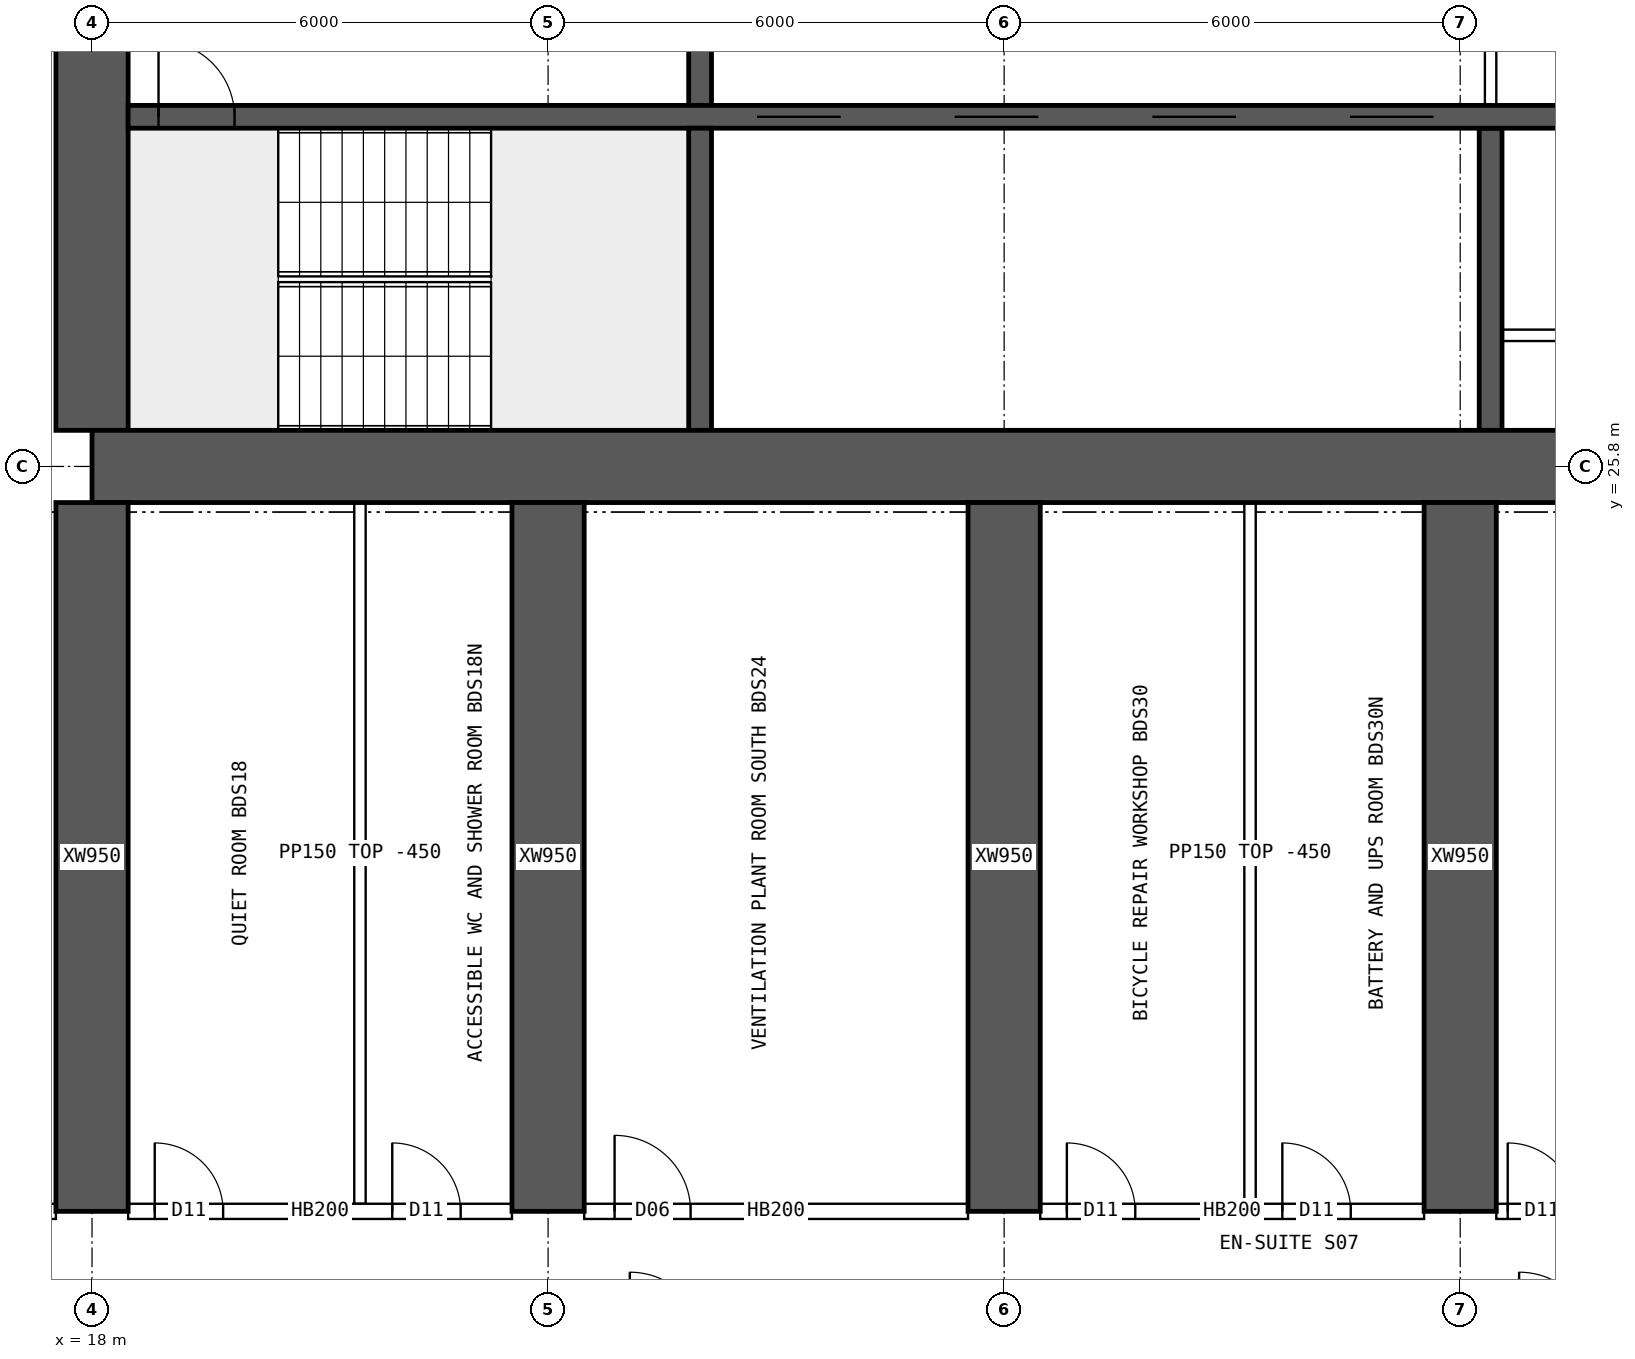
"""IFC4 building model, lengths in metres.
Left out: names, types, materials, properties, quantities, classifications, styles, units other than length and angle.
Written with IfcOpenShell. Run it as: python <this file> out.ifc"""

import sys

from ifc_helpers import new_model, si_unit, direction, frame, frame_2d, origin, place, context, subcontext, project, spatial, rectangle, extrude, element, fill, save


model = new_model("IFC4")
c1 = context("Model", 3, precision=1e-05, world=origin(), true_north=direction((0.0, 1.0)))
c2 = subcontext(c1, "Body", "Model", "MODEL_VIEW")
j1 = project(units=[si_unit("LENGTHUNIT", "METRE"), si_unit("PLANEANGLEUNIT", "RADIAN")], contexts=[c1])
p1 = place(None, origin())
s1 = spatial("IfcSite", under=j1, at=p1, CompositionType="ELEMENT")
p2 = place(p1, origin())
s2 = spatial("IfcBuilding", under=s1, at=p2, CompositionType="ELEMENT")
p3 = place(p2, frame((0.0, 0.0, 95.65)))
s3 = spatial("IfcBuildingStorey", under=s2, at=p3, CompositionType="ELEMENT", Elevation=95.65)
p4 = place(p3, frame((18.0, 25.8, 0.0), z_axis=(0.0, 0.0, 1.0), x_axis=(1.0, 0.0, 0.0)))
e1 = element("IfcWall", 1, at=p4, inside=s3, PredefinedType="SHEAR", context=c2, shape_type="SweptSolid", body=[
    extrude(rectangle(XDim=48.0, YDim=0.95, at=frame_2d((24.0, 0.0))), origin(), (0.0, 0.0, 1.0), 3.75),
])
p5 = place(p3, frame((18.0, 26.275, 0.0), z_axis=(0.0, 0.0, 1.0), x_axis=(0.0, 1.0, 0.0)))
e2 = element("IfcWall", 2, at=p5, inside=s3, PredefinedType="SHEAR", context=c2, shape_type="SweptSolid", body=[
    extrude(rectangle(XDim=11.45, YDim=0.95, at=frame_2d((5.725, 0.0))), origin(), (0.0, 0.0, 1.0), 3.75),
])
p6 = place(p5, frame((5.025, 0.0, 0.0)))
e3 = element("IfcOpeningElement", 3, at=p6, cuts=e2, PredefinedType="OPENING", context=c2, shape_type="SweptSolid", body=[
    extrude(rectangle(XDim=1.2, YDim=2.1, at=frame_2d((0.6, 1.05))), frame((0.0, 0.485, 0.0), z_axis=(0.0, -1.0, 0.0), x_axis=(1.0, 0.0, 0.0)), (0.0, 0.0, 1.0), 0.97),
])
p7 = place(p3, frame((18.475, 30.4, 0.0), z_axis=(0.0, 0.0, 1.0), x_axis=(1.0, 0.0, 0.0)))
e4 = element("IfcWall", 4, at=p7, inside=s3, PredefinedType="SHEAR", context=c2, shape_type="SweptSolid", body=[
    extrude(rectangle(XDim=47.05, YDim=0.3, at=frame_2d((23.525, 0.0))), origin(), (0.0, 0.0, 1.0), 3.75),
])
p8 = place(p7, frame((0.4, 0.0, 0.0)))
e5 = element("IfcOpeningElement", 5, at=p8, cuts=e4, PredefinedType="OPENING", context=c2, shape_type="SweptSolid", body=[
    extrude(rectangle(XDim=1.0, YDim=2.1, at=frame_2d((0.5, 1.05))), frame((0.0, 0.16, 0.0), z_axis=(0.0, -1.0, 0.0), x_axis=(1.0, 0.0, 0.0)), (0.0, 0.0, 1.0), 0.32),
])
p9 = place(p7, frame((45.65, 0.0, 0.0)))
e6 = element("IfcOpeningElement", 6, at=p9, cuts=e4, PredefinedType="OPENING", context=c2, shape_type="SweptSolid", body=[
    extrude(rectangle(XDim=1.0, YDim=2.1, at=frame_2d((0.5, 1.05))), frame((0.0, 0.16, 0.0), z_axis=(0.0, -1.0, 0.0), x_axis=(1.0, 0.0, 0.0)), (0.0, 0.0, 1.0), 0.32),
])
p10 = place(p7, frame((8.275, 0.0, 0.0)))
e7 = element("IfcOpeningElement", 7, at=p10, cuts=e4, PredefinedType="OPENING", context=c2, shape_type="SweptSolid", body=[
    extrude(rectangle(XDim=1.1, YDim=2.1, at=frame_2d((0.55, 1.05))), frame((0.0, 0.16, 0.0), z_axis=(0.0, -1.0, 0.0), x_axis=(1.0, 0.0, 0.0)), (0.0, 0.0, 1.0), 0.32),
])
p11 = place(p7, frame((10.875, 0.0, 0.0)))
e8 = element("IfcOpeningElement", 8, at=p11, cuts=e4, PredefinedType="OPENING", context=c2, shape_type="SweptSolid", body=[
    extrude(rectangle(XDim=1.1, YDim=2.1, at=frame_2d((0.55, 1.05))), frame((0.0, 0.16, 0.0), z_axis=(0.0, -1.0, 0.0), x_axis=(1.0, 0.0, 0.0)), (0.0, 0.0, 1.0), 0.32),
])
p12 = place(p7, frame((13.475, 0.0, 0.0)))
e9 = element("IfcOpeningElement", 9, at=p12, cuts=e4, PredefinedType="OPENING", context=c2, shape_type="SweptSolid", body=[
    extrude(rectangle(XDim=1.1, YDim=2.1, at=frame_2d((0.55, 1.05))), frame((0.0, 0.16, 0.0), z_axis=(0.0, -1.0, 0.0), x_axis=(1.0, 0.0, 0.0)), (0.0, 0.0, 1.0), 0.32),
])
p13 = place(p7, frame((16.075, 0.0, 0.0)))
e10 = element("IfcOpeningElement", 10, at=p13, cuts=e4, PredefinedType="OPENING", context=c2, shape_type="SweptSolid", body=[
    extrude(rectangle(XDim=1.1, YDim=2.1, at=frame_2d((0.55, 1.05))), frame((0.0, 0.16, 0.0), z_axis=(0.0, -1.0, 0.0), x_axis=(1.0, 0.0, 0.0)), (0.0, 0.0, 1.0), 0.32),
])
p14 = place(p7, frame((18.85, 0.0, 0.0)))
e11 = element("IfcOpeningElement", 11, at=p14, cuts=e4, PredefinedType="OPENING", context=c2, shape_type="SweptSolid", body=[
    extrude(rectangle(XDim=0.9, YDim=2.1, at=frame_2d((0.45, 1.05))), frame((0.0, 0.16, 0.0), z_axis=(0.0, -1.0, 0.0), x_axis=(1.0, 0.0, 0.0)), (0.0, 0.0, 1.0), 0.32),
])
p15 = place(p7, frame((30.142, 0.0, 0.0)))
e12 = element("IfcOpeningElement", 12, at=p15, cuts=e4, PredefinedType="OPENING", context=c2, shape_type="SweptSolid", body=[
    extrude(rectangle(XDim=1.1, YDim=2.1, at=frame_2d((0.55, 1.05))), frame((0.0, 0.16, 0.0), z_axis=(0.0, -1.0, 0.0), x_axis=(1.0, 0.0, 0.0)), (0.0, 0.0, 1.0), 0.32),
])
p16 = place(p7, frame((33.675, 0.0, 0.0)))
e13 = element("IfcOpeningElement", 13, at=p16, cuts=e4, PredefinedType="OPENING", context=c2, shape_type="SweptSolid", body=[
    extrude(rectangle(XDim=1.1, YDim=2.1, at=frame_2d((0.55, 1.05))), frame((0.0, 0.16, 0.0), z_axis=(0.0, -1.0, 0.0), x_axis=(1.0, 0.0, 0.0)), (0.0, 0.0, 1.0), 0.32),
])
p17 = place(p7, frame((37.208, 0.0, 0.0)))
e14 = element("IfcOpeningElement", 14, at=p17, cuts=e4, PredefinedType="OPENING", context=c2, shape_type="SweptSolid", body=[
    extrude(rectangle(XDim=1.1, YDim=2.1, at=frame_2d((0.55, 1.05))), frame((0.0, 0.16, 0.0), z_axis=(0.0, -1.0, 0.0), x_axis=(1.0, 0.0, 0.0)), (0.0, 0.0, 1.0), 0.32),
])
p18 = place(p3, frame((26.0, 26.275, 0.0), z_axis=(0.0, 0.0, 1.0), x_axis=(0.0, 1.0, 0.0)))
e15 = element("IfcWall", 15, at=p18, inside=s3, PredefinedType="SHEAR", context=c2, shape_type="SweptSolid", body=[
    extrude(rectangle(XDim=3.975, YDim=0.3, at=frame_2d((1.988, 0.0))), origin(), (0.0, 0.0, 1.0), 3.75),
])
p19 = place(p3, frame((26.0, 30.55, 0.0), z_axis=(0.0, 0.0, 1.0), x_axis=(0.0, 1.0, 0.0)))
e16 = element("IfcWall", 16, at=p19, inside=s3, PredefinedType="SHEAR", context=c2, shape_type="SweptSolid", body=[
    extrude(rectangle(XDim=3.9, YDim=0.3, at=frame_2d((1.95, 0.0))), origin(), (0.0, 0.0, 1.0), 3.75),
])
p20 = place(p19, frame((1.4, 0.0, 0.0)))
e17 = element("IfcOpeningElement", 17, at=p20, cuts=e16, PredefinedType="OPENING", context=c2, shape_type="SweptSolid", body=[
    extrude(rectangle(XDim=1.2, YDim=2.1, at=frame_2d((0.6, 1.05))), frame((0.0, 0.16, 0.0), z_axis=(0.0, -1.0, 0.0), x_axis=(1.0, 0.0, 0.0)), (0.0, 0.0, 1.0), 0.32),
])
p21 = place(p3, frame((36.4, 26.275, 0.0), z_axis=(0.0, 0.0, 1.0), x_axis=(0.0, 1.0, 0.0)))
e18 = element("IfcWall", 18, at=p21, inside=s3, PredefinedType="SHEAR", context=c2, shape_type="SweptSolid", body=[
    extrude(rectangle(XDim=3.975, YDim=0.3, at=frame_2d((1.988, 0.0))), origin(), (0.0, 0.0, 1.0), 3.75),
])
for number, where, z_axis, x_axis in (
    (19, (18.0, 16.0, 0.0), (0.0, 0.0, 1.0), (0.0, 1.0, 0.0)),
    (20, (24.0, 16.0, 0.0), (0.0, 0.0, 1.0), (0.0, 1.0, 0.0)),
    (21, (30.0, 16.0, 0.0), (0.0, 0.0, 1.0), (0.0, 1.0, 0.0)),
    (22, (36.0, 16.0, 0.0), (0.0, 0.0, 1.0), (0.0, 1.0, 0.0)),
):
    element("IfcWall", number, at=place(p3, frame(where, z_axis=z_axis, x_axis=x_axis)), inside=s3, PredefinedType="SHEAR", context=c2, shape_type="SweptSolid", body=[
        extrude(rectangle(XDim=9.325, YDim=0.95, at=frame_2d((4.663, 0.0))), origin(), (0.0, 0.0, 1.0), 3.75),
    ])
p22 = place(p3, frame((36.4, 30.55, 0.0), z_axis=(0.0, 0.0, 1.0), x_axis=(0.0, 1.0, 0.0)))
e23 = element("IfcWall", 23, at=p22, inside=s3, PredefinedType="SOLIDWALL", context=c2, shape_type="SweptSolid", body=[
    extrude(rectangle(XDim=3.9, YDim=0.15, at=frame_2d((1.95, 0.0))), origin(), (0.0, 0.0, 1.0), 3.3),
])
p23 = place(p22, frame((1.15, 0.0, 0.0)))
e24 = element("IfcOpeningElement", 24, at=p23, cuts=e23, PredefinedType="OPENING", context=c2, shape_type="SweptSolid", body=[
    extrude(rectangle(XDim=1.6, YDim=2.1, at=frame_2d((0.8, 1.05))), frame((0.0, 0.085, 0.0), z_axis=(0.0, -1.0, 0.0), x_axis=(1.0, 0.0, 0.0)), (0.0, 0.0, 1.0), 0.17),
])
p24 = place(p3, frame((36.55, 27.525, 0.0), z_axis=(0.0, 0.0, 1.0), x_axis=(1.0, 0.0, 0.0)))
e25 = element("IfcWall", 25, at=p24, inside=s3, PredefinedType="SOLIDWALL", context=c2, shape_type="SweptSolid", body=[
    extrude(rectangle(XDim=2.5, YDim=0.15, at=frame_2d((1.25, 0.0))), origin(), (0.0, 0.0, 1.0), 3.3),
])
p25 = place(p24, frame((0.8, 0.0, 0.0)))
e26 = element("IfcOpeningElement", 26, at=p25, cuts=e25, PredefinedType="OPENING", context=c2, shape_type="SweptSolid", body=[
    extrude(rectangle(XDim=0.9, YDim=2.1, at=frame_2d((0.45, 1.05))), frame((0.0, 0.085, 0.0), z_axis=(0.0, -1.0, 0.0), x_axis=(1.0, 0.0, 0.0)), (0.0, 0.0, 1.0), 0.17),
])
p26 = place(p3, frame((12.475, 16.0, 0.0), z_axis=(0.0, 0.0, 1.0), x_axis=(1.0, 0.0, 0.0)))
e27 = element("IfcWall", 27, at=p26, inside=s3, PredefinedType="SOLIDWALL", context=c2, shape_type="SweptSolid", body=[
    extrude(rectangle(XDim=5.05, YDim=0.2, at=frame_2d((2.525, 0.0))), origin(), (0.0, 0.0, 1.0), 3.3),
])
p27 = place(p26, frame((3.325, 0.0, 0.0)))
e28 = element("IfcOpeningElement", 28, at=p27, cuts=e27, PredefinedType="OPENING", context=c2, shape_type="SweptSolid", body=[
    extrude(rectangle(XDim=1.6, YDim=2.1, at=frame_2d((0.8, 1.05))), frame((0.0, 0.11, 0.0), z_axis=(0.0, -1.0, 0.0), x_axis=(1.0, 0.0, 0.0)), (0.0, 0.0, 1.0), 0.22),
])
p28 = place(p3, frame((18.475, 16.0, 0.0), z_axis=(0.0, 0.0, 1.0), x_axis=(1.0, 0.0, 0.0)))
e29 = element("IfcWall", 29, at=p28, inside=s3, PredefinedType="SOLIDWALL", context=c2, shape_type="SweptSolid", body=[
    extrude(rectangle(XDim=5.05, YDim=0.2, at=frame_2d((2.525, 0.0))), origin(), (0.0, 0.0, 1.0), 3.3),
])
p29 = place(p28, frame((0.35, 0.0, 0.0)))
e30 = element("IfcOpeningElement", 30, at=p29, cuts=e29, PredefinedType="OPENING", context=c2, shape_type="SweptSolid", body=[
    extrude(rectangle(XDim=0.9, YDim=2.1, at=frame_2d((0.45, 1.05))), frame((0.0, 0.11, 0.0), z_axis=(0.0, -1.0, 0.0), x_axis=(1.0, 0.0, 0.0)), (0.0, 0.0, 1.0), 0.22),
])
p30 = place(p28, frame((3.475, 0.0, 0.0)))
e31 = element("IfcOpeningElement", 31, at=p30, cuts=e29, PredefinedType="OPENING", context=c2, shape_type="SweptSolid", body=[
    extrude(rectangle(XDim=0.9, YDim=2.1, at=frame_2d((0.45, 1.05))), frame((0.0, 0.11, 0.0), z_axis=(0.0, -1.0, 0.0), x_axis=(1.0, 0.0, 0.0)), (0.0, 0.0, 1.0), 0.22),
])
p31 = place(p3, frame((24.475, 16.0, 0.0), z_axis=(0.0, 0.0, 1.0), x_axis=(1.0, 0.0, 0.0)))
e32 = element("IfcWall", 32, at=p31, inside=s3, PredefinedType="SOLIDWALL", context=c2, shape_type="SweptSolid", body=[
    extrude(rectangle(XDim=5.05, YDim=0.2, at=frame_2d((2.525, 0.0))), origin(), (0.0, 0.0, 1.0), 3.3),
])
p32 = place(p31, frame((0.4, 0.0, 0.0)))
e33 = element("IfcOpeningElement", 33, at=p32, cuts=e32, PredefinedType="OPENING", context=c2, shape_type="SweptSolid", body=[
    extrude(rectangle(XDim=1.0, YDim=2.1, at=frame_2d((0.5, 1.05))), frame((0.0, 0.11, 0.0), z_axis=(0.0, -1.0, 0.0), x_axis=(1.0, 0.0, 0.0)), (0.0, 0.0, 1.0), 0.22),
])
p33 = place(p3, frame((30.475, 16.0, 0.0), z_axis=(0.0, 0.0, 1.0), x_axis=(1.0, 0.0, 0.0)))
e34 = element("IfcWall", 34, at=p33, inside=s3, PredefinedType="SOLIDWALL", context=c2, shape_type="SweptSolid", body=[
    extrude(rectangle(XDim=5.05, YDim=0.2, at=frame_2d((2.525, 0.0))), origin(), (0.0, 0.0, 1.0), 3.3),
])
p34 = place(p33, frame((0.35, 0.0, 0.0)))
e35 = element("IfcOpeningElement", 35, at=p34, cuts=e34, PredefinedType="OPENING", context=c2, shape_type="SweptSolid", body=[
    extrude(rectangle(XDim=0.9, YDim=2.1, at=frame_2d((0.45, 1.05))), frame((0.0, 0.11, 0.0), z_axis=(0.0, -1.0, 0.0), x_axis=(1.0, 0.0, 0.0)), (0.0, 0.0, 1.0), 0.22),
])
p35 = place(p33, frame((3.185, 0.0, 0.0)))
e36 = element("IfcOpeningElement", 36, at=p35, cuts=e34, PredefinedType="OPENING", context=c2, shape_type="SweptSolid", body=[
    extrude(rectangle(XDim=0.9, YDim=2.1, at=frame_2d((0.45, 1.05))), frame((0.0, 0.11, 0.0), z_axis=(0.0, -1.0, 0.0), x_axis=(1.0, 0.0, 0.0)), (0.0, 0.0, 1.0), 0.22),
])
p36 = place(p3, frame((36.475, 16.0, 0.0), z_axis=(0.0, 0.0, 1.0), x_axis=(1.0, 0.0, 0.0)))
e37 = element("IfcWall", 37, at=p36, inside=s3, PredefinedType="SOLIDWALL", context=c2, shape_type="SweptSolid", body=[
    extrude(rectangle(XDim=5.05, YDim=0.2, at=frame_2d((2.525, 0.0))), origin(), (0.0, 0.0, 1.0), 3.3),
])
p37 = place(p36, frame((0.15, 0.0, 0.0)))
e38 = element("IfcOpeningElement", 38, at=p37, cuts=e37, PredefinedType="OPENING", context=c2, shape_type="SweptSolid", body=[
    extrude(rectangle(XDim=0.9, YDim=2.1, at=frame_2d((0.45, 1.05))), frame((0.0, 0.11, 0.0), z_axis=(0.0, -1.0, 0.0), x_axis=(1.0, 0.0, 0.0)), (0.0, 0.0, 1.0), 0.22),
])
p38 = place(p36, frame((3.405, 0.0, 0.0)))
e39 = element("IfcOpeningElement", 39, at=p38, cuts=e37, PredefinedType="OPENING", context=c2, shape_type="SweptSolid", body=[
    extrude(rectangle(XDim=0.9, YDim=2.1, at=frame_2d((0.45, 1.05))), frame((0.0, 0.11, 0.0), z_axis=(0.0, -1.0, 0.0), x_axis=(1.0, 0.0, 0.0)), (0.0, 0.0, 1.0), 0.22),
])
for number, where, z_axis, x_axis in (
    (40, (21.525, 16.1, 0.0), (0.0, 0.0, 1.0), (0.0, 1.0, 0.0)),
    (41, (33.235, 16.1, 0.0), (0.0, 0.0, 1.0), (0.0, 1.0, 0.0)),
):
    element("IfcWall", number, at=place(p3, frame(where, z_axis=z_axis, x_axis=x_axis)), inside=s3, PredefinedType="PARTITIONING", context=c2, shape_type="SweptSolid", body=[
        extrude(rectangle(XDim=9.225, YDim=0.15, at=frame_2d((4.612, 0.0))), origin(), (0.0, 0.0, 1.0), 3.3),
    ])
p39 = place(p8, origin())
e42 = element("IfcDoor", 42, at=p39, inside=s3, OperationType="SINGLE_SWING_LEFT", PredefinedType="DOOR", context=c2, shape_type="SweptSolid", body=[
    extrude(rectangle(XDim=1.0, YDim=2.1, at=frame_2d((0.5, 1.05))), frame((0.0, 0.025, 0.0), z_axis=(0.0, -1.0, 0.0), x_axis=(1.0, 0.0, 0.0)), (0.0, 0.0, 1.0), 0.05),
])
fill(e5, e42)
p40 = place(p10, origin())
e43 = element("IfcDoor", 43, at=p40, inside=s3, OperationType="DOUBLE_DOOR_SLIDING", PredefinedType="DOOR", context=c2, shape_type="SweptSolid", body=[
    extrude(rectangle(XDim=1.1, YDim=2.1, at=frame_2d((0.55, 1.05))), frame((0.0, 0.025, 0.0), z_axis=(0.0, -1.0, 0.0), x_axis=(1.0, 0.0, 0.0)), (0.0, 0.0, 1.0), 0.05),
])
fill(e7, e43)
p41 = place(p11, origin())
e44 = element("IfcDoor", 44, at=p41, inside=s3, OperationType="DOUBLE_DOOR_SLIDING", PredefinedType="DOOR", context=c2, shape_type="SweptSolid", body=[
    extrude(rectangle(XDim=1.1, YDim=2.1, at=frame_2d((0.55, 1.05))), frame((0.0, 0.025, 0.0), z_axis=(0.0, -1.0, 0.0), x_axis=(1.0, 0.0, 0.0)), (0.0, 0.0, 1.0), 0.05),
])
fill(e8, e44)
p42 = place(p12, origin())
e45 = element("IfcDoor", 45, at=p42, inside=s3, OperationType="DOUBLE_DOOR_SLIDING", PredefinedType="DOOR", context=c2, shape_type="SweptSolid", body=[
    extrude(rectangle(XDim=1.1, YDim=2.1, at=frame_2d((0.55, 1.05))), frame((0.0, 0.025, 0.0), z_axis=(0.0, -1.0, 0.0), x_axis=(1.0, 0.0, 0.0)), (0.0, 0.0, 1.0), 0.05),
])
fill(e9, e45)
p43 = place(p13, origin())
e46 = element("IfcDoor", 46, at=p43, inside=s3, OperationType="DOUBLE_DOOR_SLIDING", PredefinedType="DOOR", context=c2, shape_type="SweptSolid", body=[
    extrude(rectangle(XDim=1.1, YDim=2.1, at=frame_2d((0.55, 1.05))), frame((0.0, 0.025, 0.0), z_axis=(0.0, -1.0, 0.0), x_axis=(1.0, 0.0, 0.0)), (0.0, 0.0, 1.0), 0.05),
])
fill(e10, e46)
p44 = place(p29, origin())
e47 = element("IfcDoor", 47, at=p44, inside=s3, OperationType="SINGLE_SWING_LEFT", PredefinedType="DOOR", context=c2, shape_type="SweptSolid", body=[
    extrude(rectangle(XDim=0.9, YDim=2.1, at=frame_2d((0.45, 1.05))), frame((0.0, 0.025, 0.0), z_axis=(0.0, -1.0, 0.0), x_axis=(1.0, 0.0, 0.0)), (0.0, 0.0, 1.0), 0.05),
])
fill(e30, e47)
p45 = place(p30, origin())
e48 = element("IfcDoor", 48, at=p45, inside=s3, OperationType="SINGLE_SWING_LEFT", PredefinedType="DOOR", context=c2, shape_type="SweptSolid", body=[
    extrude(rectangle(XDim=0.9, YDim=2.1, at=frame_2d((0.45, 1.05))), frame((0.0, 0.025, 0.0), z_axis=(0.0, -1.0, 0.0), x_axis=(1.0, 0.0, 0.0)), (0.0, 0.0, 1.0), 0.05),
])
fill(e31, e48)
p46 = place(p32, origin())
e49 = element("IfcDoor", 49, at=p46, inside=s3, OperationType="SINGLE_SWING_LEFT", PredefinedType="DOOR", context=c2, shape_type="SweptSolid", body=[
    extrude(rectangle(XDim=1.0, YDim=2.1, at=frame_2d((0.5, 1.05))), frame((0.0, 0.025, 0.0), z_axis=(0.0, -1.0, 0.0), x_axis=(1.0, 0.0, 0.0)), (0.0, 0.0, 1.0), 0.05),
])
fill(e33, e49)
p47 = place(p34, origin())
e50 = element("IfcDoor", 50, at=p47, inside=s3, OperationType="SINGLE_SWING_LEFT", PredefinedType="DOOR", context=c2, shape_type="SweptSolid", body=[
    extrude(rectangle(XDim=0.9, YDim=2.1, at=frame_2d((0.45, 1.05))), frame((0.0, 0.025, 0.0), z_axis=(0.0, -1.0, 0.0), x_axis=(1.0, 0.0, 0.0)), (0.0, 0.0, 1.0), 0.05),
])
fill(e35, e50)
p48 = place(p35, origin())
e51 = element("IfcDoor", 51, at=p48, inside=s3, OperationType="SINGLE_SWING_LEFT", PredefinedType="DOOR", context=c2, shape_type="SweptSolid", body=[
    extrude(rectangle(XDim=0.9, YDim=2.1, at=frame_2d((0.45, 1.05))), frame((0.0, 0.025, 0.0), z_axis=(0.0, -1.0, 0.0), x_axis=(1.0, 0.0, 0.0)), (0.0, 0.0, 1.0), 0.05),
])
fill(e36, e51)
p49 = place(p37, origin())
e52 = element("IfcDoor", 52, at=p49, inside=s3, OperationType="SINGLE_SWING_LEFT", PredefinedType="DOOR", context=c2, shape_type="SweptSolid", body=[
    extrude(rectangle(XDim=0.9, YDim=2.1, at=frame_2d((0.45, 1.05))), frame((0.0, 0.025, 0.0), z_axis=(0.0, -1.0, 0.0), x_axis=(1.0, 0.0, 0.0)), (0.0, 0.0, 1.0), 0.05),
])
fill(e38, e52)
save(model, sys.argv[1])
